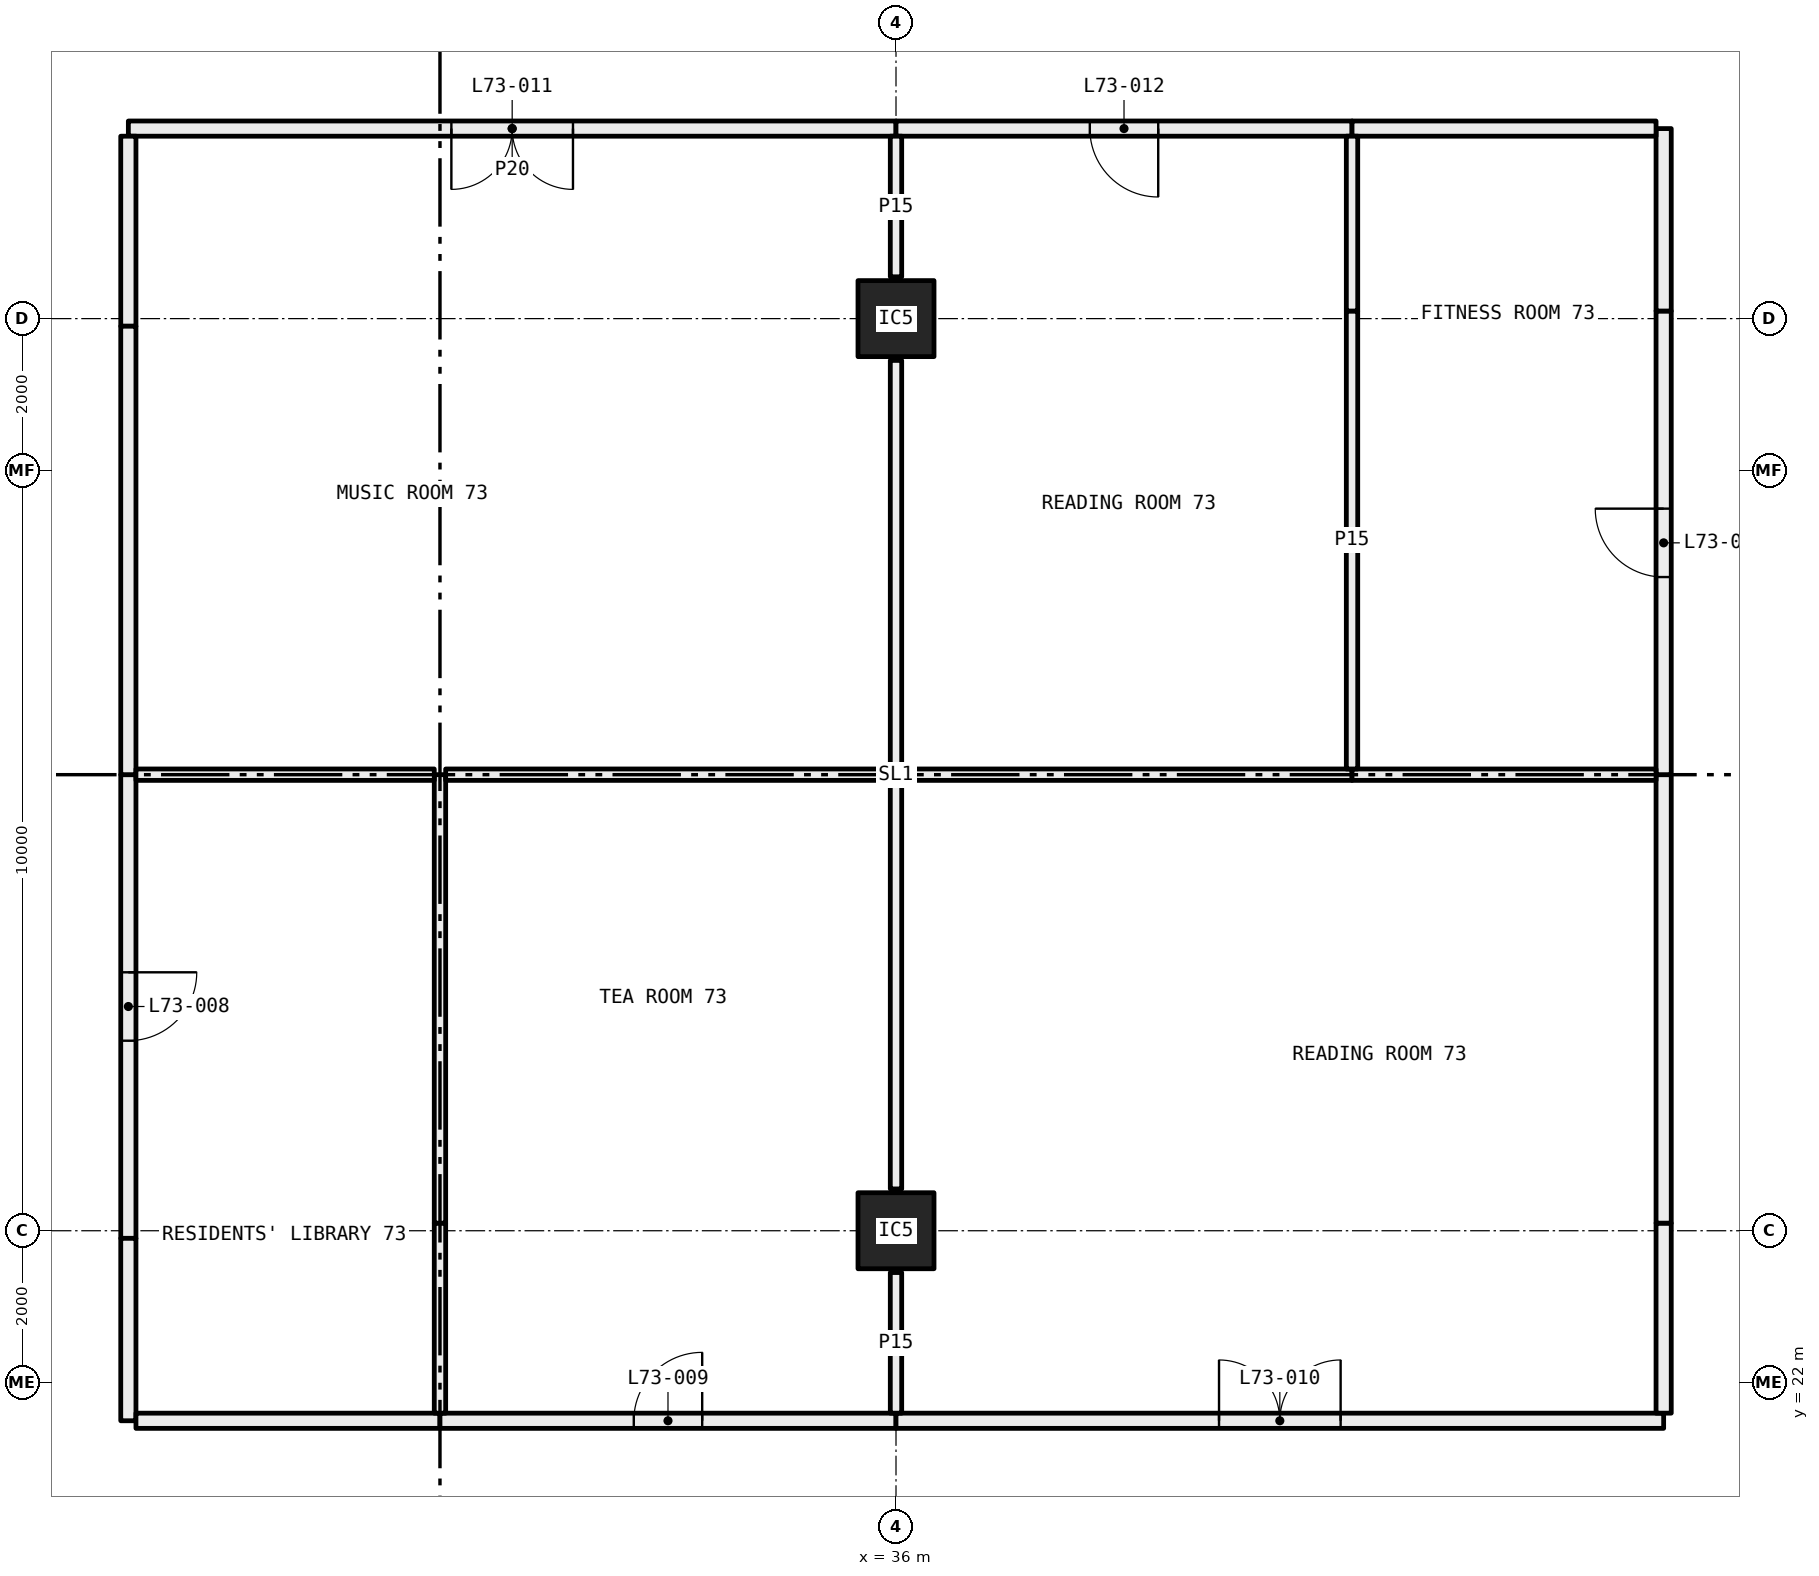
"""IFC4 building model, lengths in metres.
Left out: names, types, materials, properties, quantities, classifications, styles, units other than length and angle.
Written with IfcOpenShell. Run it as: python <this file> out.ifc"""

import sys

from ifc_helpers import new_model, si_unit, direction, frame, frame_2d, origin, origin_2d, place, context, subcontext, project, spatial, rectangle, hollow_rectangle, extrude, element, fill, save


model = new_model("IFC4")
c1 = context("Model", 3, precision=1e-05, world=origin(), true_north=direction((0.0, 1.0)))
c2 = subcontext(c1, "Body", "Model", "MODEL_VIEW")
j1 = project(units=[si_unit("LENGTHUNIT", "METRE"), si_unit("PLANEANGLEUNIT", "RADIAN")], contexts=[c1])
p1 = place(None, origin())
s1 = spatial("IfcSite", under=j1, at=p1, CompositionType="ELEMENT")
p2 = place(p1, origin())
s2 = spatial("IfcBuilding", under=s1, at=p2, CompositionType="ELEMENT")
p3 = place(p2, frame((0.0, 0.0, 269.7)))
s3 = spatial("IfcBuildingStorey", under=s2, at=p3, CompositionType="ELEMENT", Elevation=269.7)
for number, where, z_axis, x_axis in (
    (1, (36.0, 24.0, 0.0), (0.0, 0.0, 1.0), (1.0, 0.0, 0.0)),
    (2, (36.0, 36.0, 0.0), (0.0, 0.0, 1.0), (1.0, 0.0, 0.0)),
):
    element("IfcColumn", number, at=place(p3, frame(where, z_axis=z_axis, x_axis=x_axis)), inside=s3, PredefinedType="COLUMN", context=c2, shape_type="SweptSolid", body=[
        extrude(hollow_rectangle(XDim=1.0, YDim=1.0, WallThickness=0.04, at=origin_2d()), origin(), (0.0, 0.0, 1.0), 3.05),
    ])
p4 = place(p3, frame((25.9, 30.0, 0.0), z_axis=(0.0, 0.0, 1.0), x_axis=(0.0, -1.0, 0.0)))
e3 = element("IfcWall", 3, at=p4, inside=s3, PredefinedType="PARTITIONING", context=c2, shape_type="SweptSolid", body=[
    extrude(rectangle(XDim=6.1, YDim=0.2, at=frame_2d((3.05, 0.0))), origin(), (0.0, 0.0, 1.0), 2.45),
])
p5 = place(p4, frame((2.6, 0.0, 0.0)))
e4 = element("IfcOpeningElement", 4, at=p5, cuts=e3, PredefinedType="OPENING", context=c2, shape_type="SweptSolid", body=[
    extrude(rectangle(XDim=0.9, YDim=2.1, at=frame_2d((0.45, 1.05))), frame((0.0, 0.11, 0.0), z_axis=(0.0, -1.0, 0.0), x_axis=(1.0, 0.0, 0.0)), (0.0, 0.0, 1.0), 0.22),
])
p6 = place(p3, frame((25.9, 23.9, 0.0), z_axis=(0.0, 0.0, 1.0), x_axis=(0.0, -1.0, 0.0)))
e5 = element("IfcWall", 5, at=p6, inside=s3, PredefinedType="PARTITIONING", context=c2, shape_type="SweptSolid", body=[
    extrude(rectangle(XDim=2.4, YDim=0.2, at=frame_2d((1.2, 0.0))), origin(), (0.0, 0.0, 1.0), 3.05),
])
p7 = place(p3, frame((26.0, 21.5, 0.0), z_axis=(0.0, 0.0, 1.0), x_axis=(1.0, 0.0, 0.0)))
e6 = element("IfcWall", 6, at=p7, inside=s3, PredefinedType="PARTITIONING", context=c2, shape_type="SweptSolid", body=[
    extrude(rectangle(XDim=4.0, YDim=0.2, at=frame_2d((2.0, 0.0))), origin(), (0.0, 0.0, 1.0), 3.05),
])
p8 = place(p3, frame((30.0, 21.5, 0.0), z_axis=(0.0, 0.0, 1.0), x_axis=(1.0, 0.0, 0.0)))
e7 = element("IfcWall", 7, at=p8, inside=s3, PredefinedType="PARTITIONING", context=c2, shape_type="SweptSolid", body=[
    extrude(rectangle(XDim=6.0, YDim=0.2, at=frame_2d((3.0, 0.0))), origin(), (0.0, 0.0, 1.0), 3.05),
])
p9 = place(p8, frame((2.55, 0.0, 0.0)))
e8 = element("IfcOpeningElement", 8, at=p9, cuts=e7, PredefinedType="OPENING", context=c2, shape_type="SweptSolid", body=[
    extrude(rectangle(XDim=0.9, YDim=2.1, at=frame_2d((0.45, 1.05))), frame((0.0, 0.11, 0.0), z_axis=(0.0, -1.0, 0.0), x_axis=(1.0, 0.0, 0.0)), (0.0, 0.0, 1.0), 0.22),
])
p10 = place(p3, frame((36.0, 21.5, 0.0), z_axis=(0.0, 0.0, 1.0), x_axis=(1.0, 0.0, 0.0)))
e9 = element("IfcWall", 9, at=p10, inside=s3, PredefinedType="PARTITIONING", context=c2, shape_type="SweptSolid", body=[
    extrude(rectangle(XDim=10.1, YDim=0.2, at=frame_2d((5.05, 0.0))), origin(), (0.0, 0.0, 1.0), 3.05),
])
p11 = place(p10, frame((4.25, 0.0, 0.0)))
e10 = element("IfcOpeningElement", 10, at=p11, cuts=e9, PredefinedType="OPENING", context=c2, shape_type="SweptSolid", body=[
    extrude(rectangle(XDim=1.6, YDim=2.1, at=frame_2d((0.8, 1.05))), frame((0.0, 0.11, 0.0), z_axis=(0.0, -1.0, 0.0), x_axis=(1.0, 0.0, 0.0)), (0.0, 0.0, 1.0), 0.22),
])
p12 = place(p3, frame((46.1, 21.6, 0.0), z_axis=(0.0, 0.0, 1.0), x_axis=(0.0, 1.0, 0.0)))
e11 = element("IfcWall", 11, at=p12, inside=s3, PredefinedType="PARTITIONING", context=c2, shape_type="SweptSolid", body=[
    extrude(rectangle(XDim=2.5, YDim=0.2, at=frame_2d((1.25, 0.0))), origin(), (0.0, 0.0, 1.0), 2.45),
])
p13 = place(p3, frame((46.1, 24.1, 0.0), z_axis=(0.0, 0.0, 1.0), x_axis=(0.0, 1.0, 0.0)))
e12 = element("IfcWall", 12, at=p13, inside=s3, PredefinedType="PARTITIONING", context=c2, shape_type="SweptSolid", body=[
    extrude(rectangle(XDim=5.9, YDim=0.2, at=frame_2d((2.95, 0.0))), origin(), (0.0, 0.0, 1.0), 3.05),
])
p14 = place(p3, frame((36.0, 38.5, 0.0), z_axis=(0.0, 0.0, 1.0), x_axis=(-1.0, 0.0, 0.0)))
e13 = element("IfcWall", 13, at=p14, inside=s3, PredefinedType="PARTITIONING", context=c2, shape_type="SweptSolid", body=[
    extrude(rectangle(XDim=10.1, YDim=0.2, at=frame_2d((5.05, 0.0))), origin(), (0.0, 0.0, 1.0), 2.45),
])
p15 = place(p14, frame((4.25, 0.0, 0.0)))
e14 = element("IfcOpeningElement", 14, at=p15, cuts=e13, PredefinedType="OPENING", context=c2, shape_type="SweptSolid", body=[
    extrude(rectangle(XDim=1.6, YDim=2.1, at=frame_2d((0.8, 1.05))), frame((0.0, 0.11, 0.0), z_axis=(0.0, -1.0, 0.0), x_axis=(1.0, 0.0, 0.0)), (0.0, 0.0, 1.0), 0.22),
])
p16 = place(p3, frame((25.9, 38.4, 0.0), z_axis=(0.0, 0.0, 1.0), x_axis=(0.0, -1.0, 0.0)))
e15 = element("IfcWall", 15, at=p16, inside=s3, PredefinedType="PARTITIONING", context=c2, shape_type="SweptSolid", body=[
    extrude(rectangle(XDim=2.5, YDim=0.2, at=frame_2d((1.25, 0.0))), origin(), (0.0, 0.0, 1.0), 2.45),
])
p17 = place(p3, frame((25.9, 35.9, 0.0), z_axis=(0.0, 0.0, 1.0), x_axis=(0.0, -1.0, 0.0)))
e16 = element("IfcWall", 16, at=p17, inside=s3, PredefinedType="PARTITIONING", context=c2, shape_type="SweptSolid", body=[
    extrude(rectangle(XDim=5.9, YDim=0.2, at=frame_2d((2.95, 0.0))), origin(), (0.0, 0.0, 1.0), 3.05),
])
p18 = place(p3, frame((42.0, 38.5, 0.0), z_axis=(0.0, 0.0, 1.0), x_axis=(-1.0, 0.0, 0.0)))
e17 = element("IfcWall", 17, at=p18, inside=s3, PredefinedType="PARTITIONING", context=c2, shape_type="SweptSolid", body=[
    extrude(rectangle(XDim=6.0, YDim=0.2, at=frame_2d((3.0, 0.0))), origin(), (0.0, 0.0, 1.0), 2.45),
])
p19 = place(p18, frame((2.55, 0.0, 0.0)))
e18 = element("IfcOpeningElement", 18, at=p19, cuts=e17, PredefinedType="OPENING", context=c2, shape_type="SweptSolid", body=[
    extrude(rectangle(XDim=0.9, YDim=2.1, at=frame_2d((0.45, 1.05))), frame((0.0, 0.11, 0.0), z_axis=(0.0, -1.0, 0.0), x_axis=(1.0, 0.0, 0.0)), (0.0, 0.0, 1.0), 0.22),
])
p20 = place(p3, frame((46.1, 30.0, 0.0), z_axis=(0.0, 0.0, 1.0), x_axis=(0.0, 1.0, 0.0)))
e19 = element("IfcWall", 19, at=p20, inside=s3, PredefinedType="PARTITIONING", context=c2, shape_type="SweptSolid", body=[
    extrude(rectangle(XDim=6.1, YDim=0.2, at=frame_2d((3.05, 0.0))), origin(), (0.0, 0.0, 1.0), 2.45),
])
p21 = place(p20, frame((2.6, 0.0, 0.0)))
e20 = element("IfcOpeningElement", 20, at=p21, cuts=e19, PredefinedType="OPENING", context=c2, shape_type="SweptSolid", body=[
    extrude(rectangle(XDim=0.9, YDim=2.1, at=frame_2d((0.45, 1.05))), frame((0.0, 0.11, 0.0), z_axis=(0.0, -1.0, 0.0), x_axis=(1.0, 0.0, 0.0)), (0.0, 0.0, 1.0), 0.22),
])
p22 = place(p3, frame((46.1, 36.1, 0.0), z_axis=(0.0, 0.0, 1.0), x_axis=(0.0, 1.0, 0.0)))
e21 = element("IfcWall", 21, at=p22, inside=s3, PredefinedType="PARTITIONING", context=c2, shape_type="SweptSolid", body=[
    extrude(rectangle(XDim=2.4, YDim=0.2, at=frame_2d((1.2, 0.0))), origin(), (0.0, 0.0, 1.0), 3.05),
])
p23 = place(p3, frame((46.0, 38.5, 0.0), z_axis=(0.0, 0.0, 1.0), x_axis=(-1.0, 0.0, 0.0)))
e22 = element("IfcWall", 22, at=p23, inside=s3, PredefinedType="PARTITIONING", context=c2, shape_type="SweptSolid", body=[
    extrude(rectangle(XDim=4.0, YDim=0.2, at=frame_2d((2.0, 0.0))), origin(), (0.0, 0.0, 1.0), 3.05),
])
p24 = place(p3, frame((30.0, 21.6, 0.0), z_axis=(0.0, 0.0, 1.0), x_axis=(0.0, 1.0, 0.0)))
e23 = element("IfcWall", 23, at=p24, inside=s3, PredefinedType="PARTITIONING", context=c2, shape_type="SweptSolid", body=[
    extrude(rectangle(XDim=2.5, YDim=0.15, at=frame_2d((1.25, 0.0))), origin(), (0.0, 0.0, 1.0), 2.45),
])
p25 = place(p3, frame((30.0, 24.1, 0.0), z_axis=(0.0, 0.0, 1.0), x_axis=(0.0, 1.0, 0.0)))
e24 = element("IfcWall", 24, at=p25, inside=s3, PredefinedType="PARTITIONING", context=c2, shape_type="SweptSolid", body=[
    extrude(rectangle(XDim=5.9, YDim=0.15, at=frame_2d((2.95, 0.0))), origin(), (0.0, 0.0, 1.0), 3.05),
])
p26 = place(p3, frame((29.925, 30.0, 0.0), z_axis=(0.0, 0.0, 1.0), x_axis=(-1.0, 0.0, 0.0)))
e25 = element("IfcWall", 25, at=p26, inside=s3, PredefinedType="PARTITIONING", context=c2, shape_type="SweptSolid", body=[
    extrude(rectangle(XDim=3.925, YDim=0.15, at=frame_2d((1.962, 0.0))), origin(), (0.0, 0.0, 1.0), 3.05),
])
p27 = place(p3, frame((36.0, 21.6, 0.0), z_axis=(0.0, 0.0, 1.0), x_axis=(0.0, 1.0, 0.0)))
e26 = element("IfcWall", 26, at=p27, inside=s3, PredefinedType="PARTITIONING", context=c2, shape_type="SweptSolid", body=[
    extrude(rectangle(XDim=1.85, YDim=0.15, at=frame_2d((0.925, 0.0))), origin(), (0.0, 0.0, 1.0), 2.05),
])
p28 = place(p3, frame((36.0, 24.55, 0.0), z_axis=(0.0, 0.0, 1.0), x_axis=(0.0, 1.0, 0.0)))
e27 = element("IfcWall", 27, at=p28, inside=s3, PredefinedType="PARTITIONING", context=c2, shape_type="SweptSolid", body=[
    extrude(rectangle(XDim=5.45, YDim=0.15, at=frame_2d((2.725, 0.0))), origin(), (0.0, 0.0, 1.0), 2.45),
])
p29 = place(p3, frame((35.925, 30.0, 0.0), z_axis=(0.0, 0.0, 1.0), x_axis=(-1.0, 0.0, 0.0)))
e28 = element("IfcWall", 28, at=p29, inside=s3, PredefinedType="PARTITIONING", context=c2, shape_type="SweptSolid", body=[
    extrude(rectangle(XDim=5.85, YDim=0.15, at=frame_2d((2.925, 0.0))), origin(), (0.0, 0.0, 1.0), 2.45),
])
p30 = place(p3, frame((42.0, 30.0, 0.0), z_axis=(0.0, 0.0, 1.0), x_axis=(-1.0, 0.0, 0.0)))
e29 = element("IfcWall", 29, at=p30, inside=s3, PredefinedType="PARTITIONING", context=c2, shape_type="SweptSolid", body=[
    extrude(rectangle(XDim=5.925, YDim=0.15, at=frame_2d((2.962, 0.0))), origin(), (0.0, 0.0, 1.0), 2.45),
])
p31 = place(p3, frame((46.0, 30.0, 0.0), z_axis=(0.0, 0.0, 1.0), x_axis=(-1.0, 0.0, 0.0)))
e30 = element("IfcWall", 30, at=p31, inside=s3, PredefinedType="PARTITIONING", context=c2, shape_type="SweptSolid", body=[
    extrude(rectangle(XDim=4.0, YDim=0.15, at=frame_2d((2.0, 0.0))), origin(), (0.0, 0.0, 1.0), 3.05),
])
p32 = place(p3, frame((36.0, 30.075, 0.0), z_axis=(0.0, 0.0, 1.0), x_axis=(0.0, 1.0, 0.0)))
e31 = element("IfcWall", 31, at=p32, inside=s3, PredefinedType="PARTITIONING", context=c2, shape_type="SweptSolid", body=[
    extrude(rectangle(XDim=5.375, YDim=0.15, at=frame_2d((2.688, 0.0))), origin(), (0.0, 0.0, 1.0), 2.45),
])
p33 = place(p3, frame((36.0, 36.55, 0.0), z_axis=(0.0, 0.0, 1.0), x_axis=(0.0, 1.0, 0.0)))
e32 = element("IfcWall", 32, at=p33, inside=s3, PredefinedType="PARTITIONING", context=c2, shape_type="SweptSolid", body=[
    extrude(rectangle(XDim=1.85, YDim=0.15, at=frame_2d((0.925, 0.0))), origin(), (0.0, 0.0, 1.0), 2.45),
])
p34 = place(p3, frame((42.0, 30.075, 0.0), z_axis=(0.0, 0.0, 1.0), x_axis=(0.0, 1.0, 0.0)))
e33 = element("IfcWall", 33, at=p34, inside=s3, PredefinedType="PARTITIONING", context=c2, shape_type="SweptSolid", body=[
    extrude(rectangle(XDim=6.025, YDim=0.15, at=frame_2d((3.013, 0.0))), origin(), (0.0, 0.0, 1.0), 2.45),
])
p35 = place(p3, frame((42.0, 36.1, 0.0), z_axis=(0.0, 0.0, 1.0), x_axis=(0.0, 1.0, 0.0)))
e34 = element("IfcWall", 34, at=p35, inside=s3, PredefinedType="PARTITIONING", context=c2, shape_type="SweptSolid", body=[
    extrude(rectangle(XDim=2.3, YDim=0.15, at=frame_2d((1.15, 0.0))), origin(), (0.0, 0.0, 1.0), 3.05),
])
p36 = place(p5, origin())
e35 = element("IfcDoor", 35, at=p36, inside=s3, OperationType="SINGLE_SWING_RIGHT", PredefinedType="DOOR", context=c2, shape_type="SweptSolid", body=[
    extrude(rectangle(XDim=0.9, YDim=2.1, at=frame_2d((0.45, 1.05))), frame((0.0, 0.025, 0.0), z_axis=(0.0, -1.0, 0.0), x_axis=(1.0, 0.0, 0.0)), (0.0, 0.0, 1.0), 0.05),
])
fill(e4, e35)
p37 = place(p9, origin())
e36 = element("IfcDoor", 36, at=p37, inside=s3, OperationType="SINGLE_SWING_LEFT", PredefinedType="DOOR", context=c2, shape_type="SweptSolid", body=[
    extrude(rectangle(XDim=0.9, YDim=2.1, at=frame_2d((0.45, 1.05))), frame((0.0, 0.025, 0.0), z_axis=(0.0, -1.0, 0.0), x_axis=(1.0, 0.0, 0.0)), (0.0, 0.0, 1.0), 0.05),
])
fill(e8, e36)
p38 = place(p11, origin())
e37 = element("IfcDoor", 37, at=p38, inside=s3, OperationType="DOUBLE_DOOR_SINGLE_SWING", PredefinedType="DOOR", context=c2, shape_type="SweptSolid", body=[
    extrude(rectangle(XDim=1.6, YDim=2.1, at=frame_2d((0.8, 1.05))), frame((0.0, 0.025, 0.0), z_axis=(0.0, -1.0, 0.0), x_axis=(1.0, 0.0, 0.0)), (0.0, 0.0, 1.0), 0.05),
])
fill(e10, e37)
p39 = place(p15, origin())
e38 = element("IfcDoor", 38, at=p39, inside=s3, OperationType="DOUBLE_DOOR_SINGLE_SWING", PredefinedType="DOOR", context=c2, shape_type="SweptSolid", body=[
    extrude(rectangle(XDim=1.6, YDim=2.1, at=frame_2d((0.8, 1.05))), frame((0.0, 0.025, 0.0), z_axis=(0.0, -1.0, 0.0), x_axis=(1.0, 0.0, 0.0)), (0.0, 0.0, 1.0), 0.05),
])
fill(e14, e38)
p40 = place(p19, origin())
e39 = element("IfcDoor", 39, at=p40, inside=s3, OperationType="SINGLE_SWING_RIGHT", PredefinedType="DOOR", context=c2, shape_type="SweptSolid", body=[
    extrude(rectangle(XDim=0.9, YDim=2.1, at=frame_2d((0.45, 1.05))), frame((0.0, 0.025, 0.0), z_axis=(0.0, -1.0, 0.0), x_axis=(1.0, 0.0, 0.0)), (0.0, 0.0, 1.0), 0.05),
])
fill(e18, e39)
p41 = place(p21, origin())
e40 = element("IfcDoor", 40, at=p41, inside=s3, OperationType="SINGLE_SWING_LEFT", PredefinedType="DOOR", context=c2, shape_type="SweptSolid", body=[
    extrude(rectangle(XDim=0.9, YDim=2.1, at=frame_2d((0.45, 1.05))), frame((0.0, 0.025, 0.0), z_axis=(0.0, -1.0, 0.0), x_axis=(1.0, 0.0, 0.0)), (0.0, 0.0, 1.0), 0.05),
])
fill(e20, e40)
save(model, sys.argv[1])
